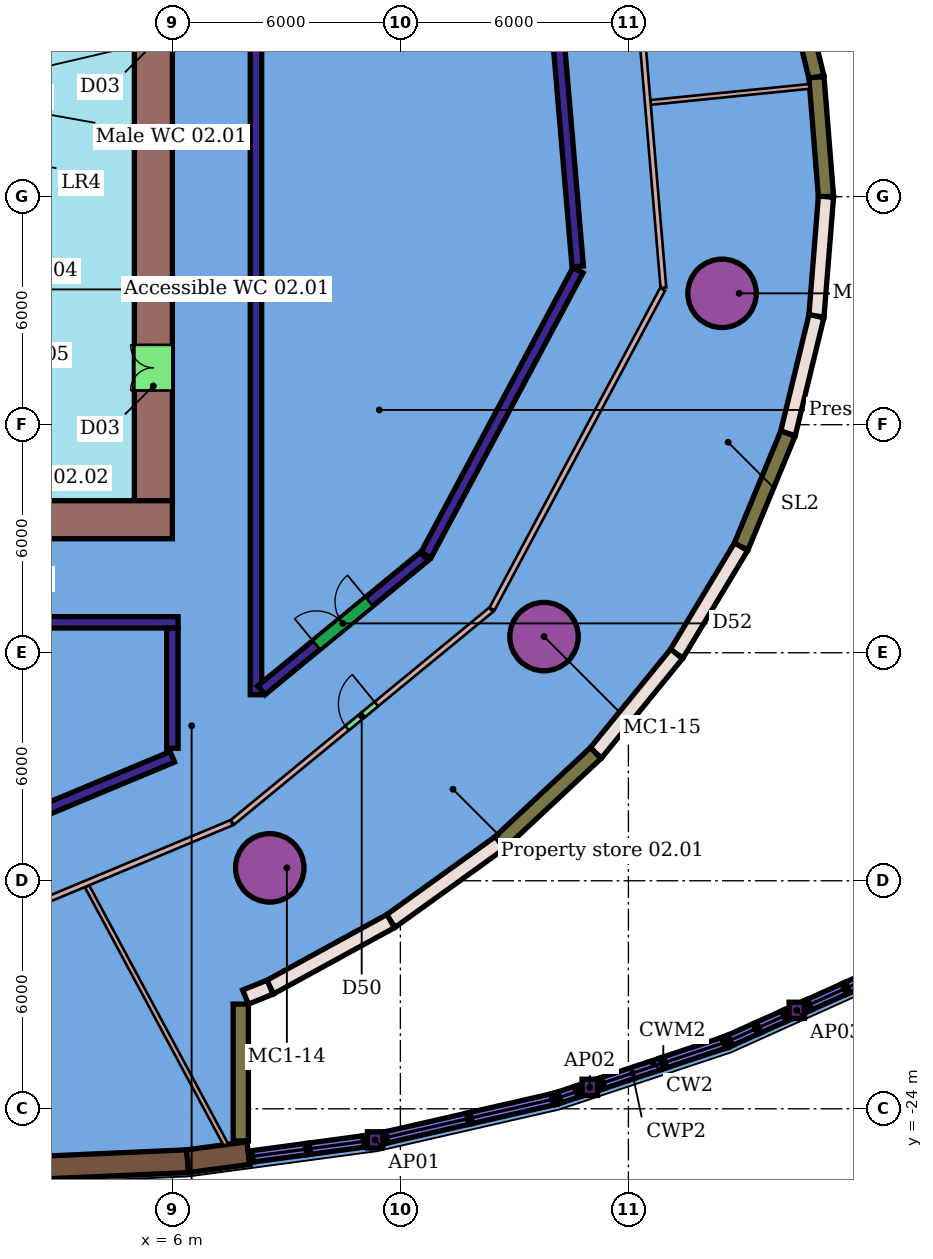
"""IFC4 building model, lengths in metres.
Left out: names, types, materials, properties, quantities, classifications, styles, units other than length and angle.
Written with IfcOpenShell. Run it as: python <this file> out.ifc"""

import sys

from ifc_helpers import new_model, si_unit, direction, frame, frame_2d, origin, origin_2d, place, context, subcontext, project, spatial, rectangle, hollow_circle, i_section, extrude, element, fill, save


model = new_model("IFC4")
c1 = context("Model", 3, precision=1e-05, world=origin(), true_north=direction((0.0, 1.0)))
c2 = subcontext(c1, "Body", "Model", "MODEL_VIEW")
j1 = project(units=[si_unit("LENGTHUNIT", "METRE"), si_unit("PLANEANGLEUNIT", "RADIAN")], contexts=[c1])
p1 = place(None, origin())
s1 = spatial("IfcSite", under=j1, at=p1, CompositionType="ELEMENT")
p2 = place(p1, origin())
s2 = spatial("IfcBuilding", under=s1, at=p2, CompositionType="ELEMENT")
p3 = place(p2, frame((0.0, 0.0, 17.0)))
s3 = spatial("IfcBuildingStorey", under=s2, at=p3, CompositionType="ELEMENT", Elevation=17.0)
for number, where, z_axis, x_axis in (
    (1, (8.563, -17.66, 0.0), (0.0, 0.0, 1.0), (1.0, 0.0, 0.0)),
    (2, (15.78, -11.576, 0.0), (0.0, 0.0, 1.0), (1.0, 0.0, 0.0)),
    (3, (20.464, -2.543, 0.0), (0.0, 0.0, 1.0), (1.0, 0.0, 0.0)),
):
    element("IfcColumn", number, at=place(p3, frame(where, z_axis=z_axis, x_axis=x_axis)), inside=s3, PredefinedType="COLUMN", context=c2, shape_type="SweptSolid", body=[
        extrude(hollow_circle(Radius=0.9, WallThickness=0.06, at=origin_2d()), origin(), (0.0, 0.0, 1.0), 8.8),
    ])
for number, where, z_axis, x_axis in (
    (4, (11.337, -24.819, 0.0), (0.0, 0.0, 1.0), (1.0, 0.0, 0.0)),
    (5, (16.985, -23.435, 0.0), (0.0, 0.0, 1.0), (1.0, 0.0, 0.0)),
    (6, (22.431, -21.409, 0.0), (0.0, 0.0, 1.0), (1.0, 0.0, 0.0)),
):
    element("IfcColumn", number, at=place(p3, frame(where, z_axis=z_axis, x_axis=x_axis)), inside=s3, PredefinedType="COLUMN", context=c2, shape_type="SweptSolid", body=[
        extrude(i_section(OverallWidth=0.407, OverallDepth=0.428, WebThickness=0.02, FlangeThickness=0.035, at=origin_2d()), origin(), (0.0, 0.0, 1.0), 8.8),
    ])
p4 = place(p3, frame((-24.097, -11.2, 0.0), z_axis=(0.0, 0.0, 1.0), x_axis=(1.0, 0.0, 0.0)))
e7 = element("IfcWall", 7, at=p4, inside=s3, PredefinedType="PARTITIONING", context=c2, shape_type="SweptSolid", body=[
    extrude(rectangle(XDim=30.248, YDim=0.3, at=frame_2d((15.124, 0.0))), origin(), (0.0, 0.0, 1.0), 8.35),
])
p5 = place(p4, frame((15.923, 0.0, 0.0)))
e8 = element("IfcOpeningElement", 8, at=p5, cuts=e7, PredefinedType="OPENING", context=c2, shape_type="SweptSolid", body=[
    extrude(rectangle(XDim=2.4, YDim=2.7, at=frame_2d((1.2, 1.35))), frame((0.0, 0.16, 0.0), z_axis=(0.0, -1.0, 0.0), x_axis=(1.0, 0.0, 0.0)), (0.0, 0.0, 1.0), 0.32),
])
p6 = place(p3, frame((8.2, -13.105, 0.0), z_axis=(0.0, 0.0, 1.0), x_axis=(0.0, 1.0, 0.0)))
e9 = element("IfcWall", 9, at=p6, inside=s3, PredefinedType="PARTITIONING", context=c2, shape_type="SweptSolid", body=[
    extrude(rectangle(XDim=22.255, YDim=0.3, at=frame_2d((11.127, 0.0))), origin(), (0.0, 0.0, 1.0), 8.35),
])
p7 = place(p3, frame((6.0, -14.514, 0.0), z_axis=(0.0, 0.0, 1.0), x_axis=(0.0, 1.0, 0.0)))
e10 = element("IfcWall", 10, at=p7, inside=s3, PredefinedType="PARTITIONING", context=c2, shape_type="SweptSolid", body=[
    extrude(rectangle(XDim=3.164, YDim=0.3, at=frame_2d((1.582, 0.0))), origin(), (0.0, 0.0, 1.0), 8.35),
])
p8 = place(p3, frame((-0.513, -17.458, 0.0), z_axis=(0.0, 0.0, 1.0), x_axis=(0.922816768599, 0.385239161552, 0.0)))
e11 = element("IfcWall", 11, at=p8, inside=s3, PredefinedType="PARTITIONING", context=c2, shape_type="SweptSolid", body=[
    extrude(rectangle(XDim=7.058, YDim=0.3, at=frame_2d((3.529, 0.0))), origin(), (0.0, 0.0, 1.0), 8.35),
])
p9 = place(p3, frame((15.959, 6.502, 0.0), z_axis=(0.0, 0.0, 1.0), x_axis=(0.084484314549, -0.996424809303, 0.0)))
e12 = element("IfcWall", 12, at=p9, inside=s3, PredefinedType="PARTITIONING", context=c2, shape_type="SweptSolid", body=[
    extrude(rectangle(XDim=8.369, YDim=0.3, at=frame_2d((4.185, 0.0))), origin(), (0.0, 0.0, 1.0), 8.35),
])
p10 = place(p3, frame((12.676, -9.427, 0.0), z_axis=(0.0, 0.0, 1.0), x_axis=(0.470743396375, 0.882270171076, 0.0)))
e13 = element("IfcWall", 13, at=p10, inside=s3, PredefinedType="PARTITIONING", context=c2, shape_type="SweptSolid", body=[
    extrude(rectangle(XDim=8.493, YDim=0.3, at=frame_2d((4.247, 0.0))), origin(), (0.0, 0.0, 1.0), 8.35),
])
p11 = place(p3, frame((8.341, -12.989, 0.0), z_axis=(0.0, 0.0, 1.0), x_axis=(0.772581343642, 0.634915795564, 0.0)))
e14 = element("IfcWall", 14, at=p11, inside=s3, PredefinedType="PARTITIONING", context=c2, shape_type="SweptSolid", body=[
    extrude(rectangle(XDim=5.549, YDim=0.3, at=frame_2d((2.774, 0.0))), origin(), (0.0, 0.0, 1.0), 8.35),
])
p12 = place(p11, frame((1.875, 0.0, 0.0)))
e15 = element("IfcOpeningElement", 15, at=p12, cuts=e14, PredefinedType="OPENING", context=c2, shape_type="SweptSolid", body=[
    extrude(rectangle(XDim=1.8, YDim=2.4, at=frame_2d((0.9, 1.2))), frame((0.0, 0.16, 0.0), z_axis=(0.0, -1.0, 0.0), x_axis=(1.0, 0.0, 0.0)), (0.0, 0.0, 1.0), 0.32),
])
p13 = place(p3, frame((18.584, 2.48, 0.0), z_axis=(0.0, 0.0, 1.0), x_axis=(0.994951140435, 0.100360490962, 0.0)))
e16 = element("IfcWall", 16, at=p13, inside=s3, PredefinedType="PARTITIONING", context=c2, shape_type="SweptSolid", body=[
    extrude(rectangle(XDim=4.204, YDim=0.125, at=frame_2d((2.102, 0.0))), origin(), (0.0, 0.0, 1.0), 8.35),
])
p14 = place(p3, frame((18.093, 7.371, 0.0), z_axis=(0.0, 0.0, 1.0), x_axis=(0.084469905026, -0.996426030945, 0.0)))
e17 = element("IfcWall", 17, at=p14, inside=s3, PredefinedType="PARTITIONING", context=c2, shape_type="SweptSolid", body=[
    extrude(rectangle(XDim=9.801, YDim=0.15, at=frame_2d((4.9, 0.0))), origin(), (0.0, 0.0, 1.0), 8.35),
])
p15 = place(p3, frame((3.755, -18.148, 0.0), z_axis=(0.0, 0.0, 1.0), x_axis=(0.473465520946, -0.88081235259, 0.0)))
e18 = element("IfcWall", 18, at=p15, inside=s3, PredefinedType="PARTITIONING", context=c2, shape_type="SweptSolid", body=[
    extrude(rectangle(XDim=7.714, YDim=0.125, at=frame_2d((3.857, 0.0))), origin(), (0.0, 0.0, 1.0), 8.35),
])
p16 = place(p3, frame((0.004, -19.626, 0.0), z_axis=(0.0, 0.0, 1.0), x_axis=(0.922818121352, 0.385235921097, 0.0)))
e19 = element("IfcWall", 19, at=p16, inside=s3, PredefinedType="PARTITIONING", context=c2, shape_type="SweptSolid", body=[
    extrude(rectangle(XDim=8.184, YDim=0.15, at=frame_2d((4.092, 0.0))), origin(), (0.0, 0.0, 1.0), 8.35),
])
p17 = place(p3, frame((7.577, -16.465, 0.0), z_axis=(0.0, 0.0, 1.0), x_axis=(0.772575830308, 0.634922504266, 0.0)))
e20 = element("IfcWall", 20, at=p17, inside=s3, PredefinedType="PARTITIONING", context=c2, shape_type="SweptSolid", body=[
    extrude(rectangle(XDim=8.815, YDim=0.15, at=frame_2d((4.407, 0.0))), origin(), (0.0, 0.0, 1.0), 8.35),
])
p18 = place(p17, frame((3.907, 0.0, 0.0)))
e21 = element("IfcOpeningElement", 21, at=p18, cuts=e20, PredefinedType="OPENING", context=c2, shape_type="SweptSolid", body=[
    extrude(rectangle(XDim=1.0, YDim=2.1, at=frame_2d((0.5, 1.05))), frame((0.0, 0.085, 0.0), z_axis=(0.0, -1.0, 0.0), x_axis=(1.0, 0.0, 0.0)), (0.0, 0.0, 1.0), 0.17),
])
p19 = place(p3, frame((14.411, -10.848, 0.0), z_axis=(0.0, 0.0, 1.0), x_axis=(0.470742429837, 0.88227068678, 0.0)))
e22 = element("IfcWall", 22, at=p19, inside=s3, PredefinedType="PARTITIONING", context=c2, shape_type="SweptSolid", body=[
    extrude(rectangle(XDim=9.532, YDim=0.15, at=frame_2d((4.766, 0.0))), origin(), (0.0, 0.0, 1.0), 8.35),
])
p20 = place(p3, frame((1.4, -25.6, 0.0), z_axis=(0.0, 0.0, 1.0), x_axis=(0.99902630841, 0.044118421369, 0.0)))
e23 = element("IfcWall", 23, at=p20, inside=s3, PredefinedType="SOLIDWALL", context=c2, shape_type="SweptSolid", body=[
    extrude(rectangle(XDim=5.008, YDim=0.6, at=frame_2d((2.504, 0.0))), origin(), (0.0, 0.0, 1.0), 8.8),
])
p21 = place(p3, frame((6.403, -25.379, 0.0), z_axis=(0.0, 0.0, 1.0), x_axis=(0.991131029833, 0.132888230112, 0.0)))
e24 = element("IfcWall", 24, at=p21, inside=s3, PredefinedType="SOLIDWALL", context=c2, shape_type="SweptSolid", body=[
    extrude(rectangle(XDim=1.611, YDim=0.6, at=frame_2d((0.806, 0.0))), origin(), (0.0, 0.0, 1.0), 8.8),
])
p22 = place(p3, frame((22.198, 6.232, 0.0), z_axis=(0.0, 0.0, 1.0), x_axis=(0.235896812421, -0.97177810939, 0.0)))
e25 = element("IfcWall", 25, at=p22, inside=s3, PredefinedType="SOLIDWALL", context=c2, shape_type="SweptSolid", body=[
    extrude(rectangle(XDim=3.178, YDim=0.4, at=frame_2d((1.589, 0.0))), origin(), (0.0, 0.0, 1.0), 8.8),
])
p23 = place(p3, frame((22.948, 3.144, 0.0), z_axis=(0.0, 0.0, 1.0), x_axis=(0.079732915346, -0.996816263015, 0.0)))
e26 = element("IfcWall", 26, at=p23, inside=s3, PredefinedType="SOLIDWALL", context=c2, shape_type="SweptSolid", body=[
    extrude(rectangle(XDim=3.154, YDim=0.4, at=frame_2d((1.577, 0.0))), origin(), (0.0, 0.0, 1.0), 8.8),
])
p24 = place(p3, frame((23.199, 0.0, 0.0), z_axis=(0.0, 0.0, 1.0), x_axis=(-0.079732915346, -0.996816263015, 0.0)))
e27 = element("IfcWall", 27, at=p24, inside=s3, PredefinedType="SOLIDWALL", context=c2, shape_type="SweptSolid", body=[
    extrude(rectangle(XDim=3.154, YDim=0.4, at=frame_2d((1.577, 0.0))), origin(), (0.0, 0.0, 1.0), 8.4),
])
p25 = place(p3, frame((22.948, -3.144, 0.0), z_axis=(0.0, 0.0, 1.0), x_axis=(-0.235896812421, -0.97177810939, 0.0)))
e28 = element("IfcWall", 28, at=p25, inside=s3, PredefinedType="SOLIDWALL", context=c2, shape_type="SweptSolid", body=[
    extrude(rectangle(XDim=3.178, YDim=0.4, at=frame_2d((1.589, 0.0))), origin(), (0.0, 0.0, 1.0), 8.4),
])
p26 = place(p3, frame((22.198, -6.232, 0.0), z_axis=(0.0, 0.0, 1.0), x_axis=(-0.382706172342, -0.923870112976, 0.0)))
e29 = element("IfcWall", 29, at=p26, inside=s3, PredefinedType="SOLIDWALL", context=c2, shape_type="SweptSolid", body=[
    extrude(rectangle(XDim=3.225, YDim=0.4, at=frame_2d((1.612, 0.0))), origin(), (0.0, 0.0, 1.0), 8.8),
])
p27 = place(p3, frame((20.964, -9.212, 0.0), z_axis=(0.0, 0.0, 1.0), x_axis=(-0.515586767828, -0.856837373625, 0.0)))
e30 = element("IfcWall", 30, at=p27, inside=s3, PredefinedType="SOLIDWALL", context=c2, shape_type="SweptSolid", body=[
    extrude(rectangle(XDim=3.29, YDim=0.4, at=frame_2d((1.645, 0.0))), origin(), (0.0, 0.0, 1.0), 8.4),
])
p28 = place(p3, frame((19.268, -12.03, 0.0), z_axis=(0.0, 0.0, 1.0), x_axis=(-0.631953724698, -0.775006122453, 0.0)))
e31 = element("IfcWall", 31, at=p28, inside=s3, PredefinedType="SOLIDWALL", context=c2, shape_type="SweptSolid", body=[
    extrude(rectangle(XDim=3.367, YDim=0.4, at=frame_2d((1.684, 0.0))), origin(), (0.0, 0.0, 1.0), 8.4),
])
p29 = place(p3, frame((17.14, -14.64, 0.0), z_axis=(0.0, 0.0, 1.0), x_axis=(-0.730641209912, -0.682761614605, 0.0)))
e32 = element("IfcWall", 32, at=p29, inside=s3, PredefinedType="SOLIDWALL", context=c2, shape_type="SweptSolid", body=[
    extrude(rectangle(XDim=3.452, YDim=0.4, at=frame_2d((1.726, 0.0))), origin(), (0.0, 0.0, 1.0), 8.8),
])
p30 = place(p3, frame((14.618, -16.997, 0.0), z_axis=(0.0, 0.0, 1.0), x_axis=(-0.81205624831, -0.583579171648, 0.0)))
e33 = element("IfcWall", 33, at=p30, inside=s3, PredefinedType="SOLIDWALL", context=c2, shape_type="SweptSolid", body=[
    extrude(rectangle(XDim=3.538, YDim=0.4, at=frame_2d((1.769, 0.0))), origin(), (0.0, 0.0, 1.0), 8.4),
])
p31 = place(p3, frame((11.745, -19.062, 0.0), z_axis=(0.0, 0.0, 1.0), x_axis=(-0.87711318505, -0.48028372928, 0.0)))
e34 = element("IfcWall", 34, at=p31, inside=s3, PredefinedType="SOLIDWALL", context=c2, shape_type="SweptSolid", body=[
    extrude(rectangle(XDim=3.619, YDim=0.4, at=frame_2d((1.809, 0.0))), origin(), (0.0, 0.0, 1.0), 8.4),
])
p32 = place(p3, frame((8.571, -20.8, 0.0), z_axis=(0.0, 0.0, 1.0), x_axis=(-0.927141159757, -0.374712249444, 0.0)))
e35 = element("IfcWall", 35, at=p32, inside=s3, PredefinedType="SOLIDWALL", context=c2, shape_type="SweptSolid", body=[
    extrude(rectangle(XDim=0.697, YDim=0.4, at=frame_2d((0.348, 0.0))), origin(), (0.0, 0.0, 1.0), 8.4),
])
p33 = place(p3, frame((7.8, -21.246, 0.0), z_axis=(0.0, 0.0, 1.0), x_axis=(0.0, -1.0, 0.0)))
e36 = element("IfcWall", 36, at=p33, inside=s3, PredefinedType="SOLIDWALL", context=c2, shape_type="SweptSolid", body=[
    extrude(rectangle(XDim=3.599, YDim=0.4, at=frame_2d((1.8, 0.0))), origin(), (0.0, 0.0, 1.0), 8.8),
])
p34 = place(p3, frame((-18.0, -8.5, 0.0), z_axis=(0.0, 0.0, 1.0), x_axis=(1.0, 0.0, 0.0)))
e37 = element("IfcWall", 37, at=p34, inside=s3, PredefinedType="SHEAR", context=c2, shape_type="SweptSolid", body=[
    extrude(rectangle(XDim=24.0, YDim=1.0, at=frame_2d((12.0, 0.0))), origin(), (0.0, 0.0, 1.0), 8.7),
])
p35 = place(p34, frame((6.0, 0.0, 0.0)))
e38 = element("IfcOpeningElement", 38, at=p35, cuts=e37, PredefinedType="OPENING", context=c2, shape_type="SweptSolid", body=[
    extrude(rectangle(XDim=1.2, YDim=2.1, at=frame_2d((0.6, 1.05))), frame((0.0, 0.51, 0.0), z_axis=(0.0, -1.0, 0.0), x_axis=(1.0, 0.0, 0.0)), (0.0, 0.0, 1.0), 1.02),
])
p36 = place(p3, frame((5.5, -8.0, 0.0), z_axis=(0.0, 0.0, 1.0), x_axis=(0.0, 1.0, 0.0)))
e39 = element("IfcWall", 39, at=p36, inside=s3, PredefinedType="SHEAR", context=c2, shape_type="SweptSolid", body=[
    extrude(rectangle(XDim=16.0, YDim=1.0, at=frame_2d((8.0, 0.0))), origin(), (0.0, 0.0, 1.0), 8.7),
])
p37 = place(p36, frame((2.9, 0.0, 0.0)))
e40 = element("IfcOpeningElement", 40, at=p37, cuts=e39, PredefinedType="OPENING", context=c2, shape_type="SweptSolid", body=[
    extrude(rectangle(XDim=1.2, YDim=2.1, at=frame_2d((0.6, 1.05))), frame((0.0, 0.51, 0.0), z_axis=(0.0, -1.0, 0.0), x_axis=(1.0, 0.0, 0.0)), (0.0, 0.0, 1.0), 1.02),
])
p38 = place(p36, frame((11.9, 0.0, 0.0)))
e41 = element("IfcOpeningElement", 41, at=p38, cuts=e39, PredefinedType="OPENING", context=c2, shape_type="SweptSolid", body=[
    extrude(rectangle(XDim=1.2, YDim=2.1, at=frame_2d((0.6, 1.05))), frame((0.0, 0.51, 0.0), z_axis=(0.0, -1.0, 0.0), x_axis=(1.0, 0.0, 0.0)), (0.0, 0.0, 1.0), 1.02),
])
p39 = place(p12, origin())
e42 = element("IfcDoor", 42, at=p39, inside=s3, OperationType="DOUBLE_DOOR_SINGLE_SWING", PredefinedType="DOOR", context=c2, shape_type="SweptSolid", body=[
    extrude(rectangle(XDim=1.8, YDim=2.4, at=frame_2d((0.9, 1.2))), frame((0.0, 0.025, 0.0), z_axis=(0.0, -1.0, 0.0), x_axis=(1.0, 0.0, 0.0)), (0.0, 0.0, 1.0), 0.05),
])
fill(e15, e42)
p40 = place(p18, origin())
e43 = element("IfcDoor", 43, at=p40, inside=s3, OperationType="SINGLE_SWING_RIGHT", PredefinedType="DOOR", context=c2, shape_type="SweptSolid", body=[
    extrude(rectangle(XDim=1.0, YDim=2.1, at=frame_2d((0.5, 1.05))), frame((0.0, 0.025, 0.0), z_axis=(0.0, -1.0, 0.0), x_axis=(1.0, 0.0, 0.0)), (0.0, 0.0, 1.0), 0.05),
])
fill(e21, e43)
p41 = place(p37, origin())
e44 = element("IfcDoor", 44, at=p41, inside=s3, OperationType="DOUBLE_DOOR_SINGLE_SWING", PredefinedType="NOTDEFINED", context=c2, shape_type="SweptSolid", body=[
    extrude(rectangle(XDim=1.2, YDim=2.1, at=frame_2d((0.6, 1.05))), frame((0.0, 0.025, 0.0), z_axis=(0.0, -1.0, 0.0), x_axis=(1.0, 0.0, 0.0)), (0.0, 0.0, 1.0), 0.05),
])
fill(e40, e44)
save(model, sys.argv[1])
